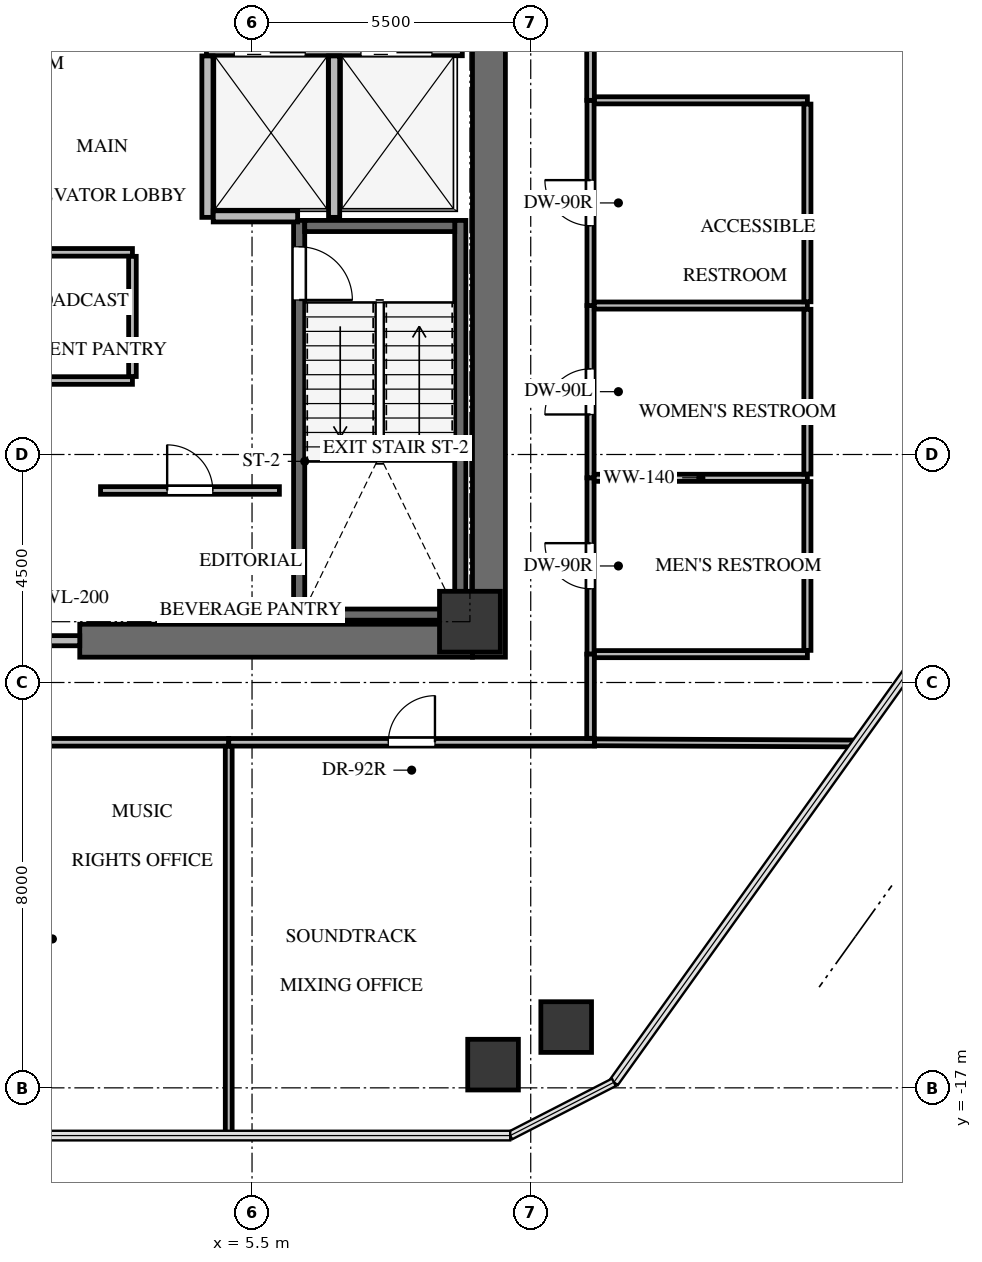
"""IFC4 building model, lengths in metres.
Left out: names, types, materials, properties, quantities, classifications, styles, units other than length and angle.
Written with IfcOpenShell. Run it as: python <this file> out.ifc"""

import sys

from ifc_helpers import new_model, si_unit, direction, frame, frame_2d, origin, origin_2d, place, context, subcontext, project, spatial, rectangle, extrude, source, transform, mapped, element, fill, save


model = new_model("IFC4")
c1 = context("Model", 3, precision=1e-05, world=origin(), true_north=direction((0.0, 1.0)))
c2 = subcontext(c1, "Body", "Model", "MODEL_VIEW")
j1 = project(units=[si_unit("LENGTHUNIT", "METRE"), si_unit("PLANEANGLEUNIT", "RADIAN")], contexts=[c1])
p1 = place(None, origin())
s1 = spatial("IfcSite", under=j1, at=p1, CompositionType="ELEMENT")
p2 = place(p1, origin())
s2 = spatial("IfcBuilding", under=s1, at=p2, CompositionType="ELEMENT")
p3 = place(p2, frame((0.0, 0.0, 209.2)))
s3 = spatial("IfcBuildingStorey", under=s2, at=p3, CompositionType="ELEMENT", Elevation=209.2)
p4 = place(p3, frame((10.175, -8.5, 0.0), z_axis=(0.0, 0.0, 1.0), x_axis=(0.0, 1.0, 0.0)))
e1 = element("IfcWall", 1, at=p4, inside=s3, PredefinedType="SHEAR", context=c2, shape_type="SweptSolid", body=[
    extrude(rectangle(XDim=17.0, YDim=0.65, at=frame_2d((8.5, 0.0))), origin(), (0.0, 0.0, 1.0), 4.2),
])
p5 = place(p3, frame((2.1, -8.175, 0.0), z_axis=(0.0, 0.0, 1.0), x_axis=(1.0, 0.0, 0.0)))
e2 = element("IfcWall", 2, at=p5, inside=s3, PredefinedType="SHEAR", context=c2, shape_type="SweptSolid", body=[
    extrude(rectangle(XDim=7.75, YDim=0.65, at=frame_2d((3.875, 0.0))), origin(), (0.0, 0.0, 1.0), 4.2),
])
p6 = place(p3, frame((9.61, -7.77, -0.24), z_axis=(0.0, 0.0, 1.0), x_axis=(0.0, 1.0, 0.0)))
e3 = element("IfcWall", 3, at=p6, inside=s3, PredefinedType="SHEAR", context=c2, shape_type="SweptSolid", body=[
    extrude(rectangle(XDim=7.89, YDim=0.22, at=frame_2d((3.945, 0.0))), origin(), (0.0, 0.0, 1.0), 4.14),
])
p7 = place(p3, frame((6.43, 0.12, -0.24), z_axis=(0.0, 0.0, 1.0), x_axis=(0.0, -1.0, 0.0)))
e4 = element("IfcWall", 4, at=p7, inside=s3, PredefinedType="SHEAR", context=c2, shape_type="SweptSolid", body=[
    extrude(rectangle(XDim=7.89, YDim=0.22, at=frame_2d((3.945, 0.0))), origin(), (0.0, 0.0, 1.0), 4.14),
])
p8 = place(p7, frame((0.52, 0.0, 0.0)))
e5 = element("IfcOpeningElement", 5, at=p8, cuts=e4, PredefinedType="OPENING", context=c2, shape_type="SweptSolid", body=[
    extrude(rectangle(XDim=1.05, YDim=2.15, at=frame_2d((0.525, 1.075))), frame((0.0, 0.12, 0.0), z_axis=(0.0, -1.0, 0.0), x_axis=(1.0, 0.0, 0.0)), (0.0, 0.0, 1.0), 0.24),
])
for number, where, z_axis, x_axis in (
    (6, (6.54, -7.66, -0.24), (0.0, 0.0, 1.0), (1.0, 0.0, 0.0)),
    (7, (9.5, 0.01, -0.24), (0.0, 0.0, 1.0), (-1.0, 0.0, 0.0)),
):
    element("IfcWall", number, at=place(p3, frame(where, z_axis=z_axis, x_axis=x_axis)), inside=s3, PredefinedType="SHEAR", context=c2, shape_type="SweptSolid", body=[
        extrude(rectangle(XDim=2.96, YDim=0.22, at=frame_2d((1.48, 0.0))), origin(), (0.0, 0.0, 1.0), 4.14),
    ])
m1 = source(origin(), c2, "Body", "SweptSolid", [
    extrude(rectangle(XDim=1.2, YDim=1.2, at=origin_2d()), origin(), (0.0, 0.0, 1.0), 4.14),
])
p9 = place(p3, frame((9.8, -7.8, -0.24), z_axis=(0.0, 0.0, 1.0), x_axis=(1.0, 0.0, 0.0)))
e8 = element("IfcColumn", 8, at=p9, inside=s3, PredefinedType="COLUMN", context=c2, shape_type="MappedRepresentation", body=[
    mapped(m1, transform((0.0, 0.0, 0.0), x_axis=(1.0, 0.0, 0.0), y_axis=(0.0, 1.0, 0.0), z_axis=(0.0, 0.0, 1.0), scale=1.0)),
])
m2 = source(origin(), c2, "Body", "SweptSolid", [
    extrude(rectangle(XDim=1.0, YDim=1.0, at=origin_2d()), origin(), (0.0, 0.0, 1.0), 4.14),
])
for number, where, z_axis, x_axis in (
    (9, (11.7, -15.8, -0.24), (0.0, 0.0, 1.0), (1.0, 0.0, 0.0)),
    (10, (10.257, -16.542, -0.24), (0.0, 0.0, 1.0), (1.0, 0.0, 0.0)),
):
    element("IfcColumn", number, at=place(p3, frame(where, z_axis=z_axis, x_axis=x_axis)), inside=s3, PredefinedType="COLUMN", context=c2, shape_type="MappedRepresentation", body=[
        mapped(m2, transform((0.0, 0.0, 0.0), x_axis=(1.0, 0.0, 0.0), y_axis=(0.0, 1.0, 0.0), z_axis=(0.0, 0.0, 1.0), scale=1.0)),
    ])
p10 = place(p3, frame((-2.1, -8.175, 0.0), z_axis=(0.0, 0.0, 1.0), x_axis=(1.0, 0.0, 0.0)))
e11 = element("IfcWall", 11, at=p10, inside=s3, PredefinedType="SOLIDWALL", context=c2, shape_type="SweptSolid", body=[
    extrude(rectangle(XDim=4.2, YDim=0.2, at=frame_2d((2.1, 0.0))), origin(), (0.0, 0.0, 1.0), 3.885),
])
p11 = place(p10, frame((1.2, 0.0, 0.0)))
e12 = element("IfcOpeningElement", 12, at=p11, cuts=e11, PredefinedType="OPENING", context=c2, shape_type="SweptSolid", body=[
    extrude(rectangle(XDim=1.8, YDim=2.15, at=frame_2d((0.9, 1.075))), frame((0.0, 0.11, 0.0), z_axis=(0.0, -1.0, 0.0), x_axis=(1.0, 0.0, 0.0)), (0.0, 0.0, 1.0), 0.22),
])
p12 = place(p3, frame((4.6, 3.48, 0.0), z_axis=(0.0, 0.0, 1.0), x_axis=(1.0, 0.0, 0.0)))
e13 = element("IfcWall", 13, at=p12, inside=s3, PredefinedType="SOLIDWALL", context=c2, shape_type="SweptSolid", body=[
    extrude(rectangle(XDim=5.05, YDim=0.22, at=frame_2d((2.525, 0.0))), origin(), (0.0, 0.0, 1.0), 3.885),
])
p13 = place(p12, frame((0.55, 0.0, 0.0)))
e14 = element("IfcOpeningElement", 14, at=p13, cuts=e13, PredefinedType="OPENING", context=c2, shape_type="SweptSolid", body=[
    extrude(rectangle(XDim=1.4, YDim=2.15, at=frame_2d((0.7, 1.075))), frame((0.0, 0.12, 0.0), z_axis=(0.0, -1.0, 0.0), x_axis=(1.0, 0.0, 0.0)), (0.0, 0.0, 1.0), 0.24),
])
p14 = place(p12, frame((3.05, 0.0, 0.0)))
e15 = element("IfcOpeningElement", 15, at=p14, cuts=e13, PredefinedType="OPENING", context=c2, shape_type="SweptSolid", body=[
    extrude(rectangle(XDim=1.4, YDim=2.15, at=frame_2d((0.7, 1.075))), frame((0.0, 0.12, 0.0), z_axis=(0.0, -1.0, 0.0), x_axis=(1.0, 0.0, 0.0)), (0.0, 0.0, 1.0), 0.24),
])
for number, where, z_axis, x_axis in (
    (16, (4.62, 0.18, 0.0), (0.0, 0.0, 1.0), (0.0, 1.0, 0.0)),
    (17, (7.12, 0.18, 0.0), (0.0, 0.0, 1.0), (0.0, 1.0, 0.0)),
):
    element("IfcWall", number, at=place(p3, frame(where, z_axis=z_axis, x_axis=x_axis)), inside=s3, PredefinedType="SOLIDWALL", context=c2, shape_type="SweptSolid", body=[
        extrude(rectangle(XDim=3.186, YDim=0.22, at=frame_2d((1.593, 0.0))), origin(), (0.0, 0.0, 1.0), 3.885),
    ])
p15 = place(p3, frame((4.734, 0.2, 0.0), z_axis=(0.0, 0.0, 1.0), x_axis=(1.0, 0.0, 0.0)))
e18 = element("IfcWall", 18, at=p15, inside=s3, PredefinedType="SOLIDWALL", context=c2, shape_type="SweptSolid", body=[
    extrude(rectangle(XDim=1.666, YDim=0.22, at=frame_2d((0.833, 0.0))), origin(), (0.0, 0.0, 1.0), 3.885),
])
p16 = place(p3, frame((2.51, -5.21, 0.0), z_axis=(0.0, 0.0, 1.0), x_axis=(1.0, 0.0, 0.0)))
e19 = element("IfcWall", 19, at=p16, inside=s3, PredefinedType="PARTITIONING", context=c2, shape_type="SweptSolid", body=[
    extrude(rectangle(XDim=3.53, YDim=0.15, at=frame_2d((1.765, 0.0))), origin(), (0.0, 0.0, 1.0), 3.885),
])
p17 = place(p16, frame((1.315, 0.0, 0.0)))
e20 = element("IfcOpeningElement", 20, at=p17, cuts=e19, PredefinedType="OPENING", context=c2, shape_type="SweptSolid", body=[
    extrude(rectangle(XDim=0.9, YDim=2.05, at=frame_2d((0.45, 1.025))), frame((0.0, 0.085, 0.0), z_axis=(0.0, -1.0, 0.0), x_axis=(1.0, 0.0, 0.0)), (0.0, 0.0, 1.0), 0.17),
])
p18 = place(p3, frame((3.14, -3.04, 0.0), z_axis=(0.0, 0.0, 1.0), x_axis=(-1.0, 0.0, 0.0)))
e21 = element("IfcWall", 21, at=p18, inside=s3, PredefinedType="PARTITIONING", context=c2, shape_type="SweptSolid", body=[
    extrude(rectangle(XDim=7.48, YDim=0.15, at=frame_2d((3.74, 0.0))), origin(), (0.0, 0.0, 1.0), 3.885),
])
p19 = place(p18, frame((3.29, 0.0, 0.0)))
e22 = element("IfcOpeningElement", 22, at=p19, cuts=e21, PredefinedType="OPENING", context=c2, shape_type="SweptSolid", body=[
    extrude(rectangle(XDim=0.9, YDim=2.05, at=frame_2d((0.45, 1.025))), frame((0.0, 0.085, 0.0), z_axis=(0.0, -1.0, 0.0), x_axis=(1.0, 0.0, 0.0)), (0.0, 0.0, 1.0), 0.17),
])
p20 = place(p3, frame((-4.34, -0.51, 0.0), z_axis=(0.0, 0.0, 1.0), x_axis=(1.0, 0.0, 0.0)))
e23 = element("IfcWall", 23, at=p20, inside=s3, PredefinedType="PARTITIONING", context=c2, shape_type="SweptSolid", body=[
    extrude(rectangle(XDim=7.48, YDim=0.15, at=frame_2d((3.74, 0.0))), origin(), (0.0, 0.0, 1.0), 3.885),
])
p21 = place(p3, frame((3.14, -0.589, 0.0), z_axis=(0.0, 0.0, 1.0), x_axis=(0.0, -1.0, 0.0)))
e24 = element("IfcWall", 24, at=p21, inside=s3, PredefinedType="PARTITIONING", context=c2, shape_type="SweptSolid", body=[
    extrude(rectangle(XDim=2.372, YDim=0.15, at=frame_2d((1.186, 0.0))), origin(), (0.0, 0.0, 1.0), 3.885),
])
p22 = place(p3, frame((12.18, -8.44, 0.0), z_axis=(0.0, 0.0, 1.0), x_axis=(0.0, 1.0, 0.0)))
e25 = element("IfcWall", 25, at=p22, inside=s3, PredefinedType="PARTITIONING", context=c2, shape_type="SweptSolid", body=[
    extrude(rectangle(XDim=3.48, YDim=0.14, at=frame_2d((1.74, 0.0))), origin(), (0.0, 0.0, 1.0), 3.885),
])
p23 = place(p22, frame((1.29, 0.0, 0.0)))
e26 = element("IfcOpeningElement", 26, at=p23, cuts=e25, PredefinedType="OPENING", context=c2, shape_type="SweptSolid", body=[
    extrude(rectangle(XDim=0.9, YDim=2.05, at=frame_2d((0.45, 1.025))), frame((0.0, 0.08, 0.0), z_axis=(0.0, -1.0, 0.0), x_axis=(1.0, 0.0, 0.0)), (0.0, 0.0, 1.0), 0.16),
])
p24 = place(p3, frame((12.18, -4.96, 0.0), z_axis=(0.0, 0.0, 1.0), x_axis=(0.0, 1.0, 0.0)))
e27 = element("IfcWall", 27, at=p24, inside=s3, PredefinedType="PARTITIONING", context=c2, shape_type="SweptSolid", body=[
    extrude(rectangle(XDim=3.4, YDim=0.14, at=frame_2d((1.7, 0.0))), origin(), (0.0, 0.0, 1.0), 3.885),
])
p25 = place(p24, frame((1.25, 0.0, 0.0)))
e28 = element("IfcOpeningElement", 28, at=p25, cuts=e27, PredefinedType="OPENING", context=c2, shape_type="SweptSolid", body=[
    extrude(rectangle(XDim=0.9, YDim=2.05, at=frame_2d((0.45, 1.025))), frame((0.0, 0.08, 0.0), z_axis=(0.0, -1.0, 0.0), x_axis=(1.0, 0.0, 0.0)), (0.0, 0.0, 1.0), 0.16),
])
p26 = place(p3, frame((12.18, -1.56, 0.0), z_axis=(0.0, 0.0, 1.0), x_axis=(0.0, 1.0, 0.0)))
e29 = element("IfcWall", 29, at=p26, inside=s3, PredefinedType="PARTITIONING", context=c2, shape_type="SweptSolid", body=[
    extrude(rectangle(XDim=4.05, YDim=0.14, at=frame_2d((2.025, 0.0))), origin(), (0.0, 0.0, 1.0), 2.47),
])
p27 = place(p26, frame((1.575, 0.0, 0.0)))
e30 = element("IfcOpeningElement", 30, at=p27, cuts=e29, PredefinedType="OPENING", context=c2, shape_type="SweptSolid", body=[
    extrude(rectangle(XDim=0.9, YDim=2.05, at=frame_2d((0.45, 1.025))), frame((0.0, 0.08, 0.0), z_axis=(0.0, -1.0, 0.0), x_axis=(1.0, 0.0, 0.0)), (0.0, 0.0, 1.0), 0.16),
])
p28 = place(p3, frame((1.089, -10.18, 0.0), z_axis=(0.0, 0.0, 1.0), x_axis=(1.0, 0.0, 0.0)))
e31 = element("IfcWall", 31, at=p28, inside=s3, PredefinedType="PARTITIONING", context=c2, shape_type="SweptSolid", body=[
    extrude(rectangle(XDim=3.951, YDim=0.15, at=frame_2d((1.976, 0.0))), origin(), (0.0, 0.0, 1.0), 2.47),
])
p29 = place(p3, frame((5.04, -10.18, 0.0), z_axis=(0.0, 0.0, 1.0), x_axis=(1.0, 0.0, 0.0)))
e32 = element("IfcWall", 32, at=p29, inside=s3, PredefinedType="PARTITIONING", context=c2, shape_type="SweptSolid", body=[
    extrude(rectangle(XDim=7.22, YDim=0.15, at=frame_2d((3.61, 0.0))), origin(), (0.0, 0.0, 1.0), 2.47),
])
p30 = place(p29, frame((3.15, 0.0, 0.0)))
e33 = element("IfcOpeningElement", 33, at=p30, cuts=e32, PredefinedType="OPENING", context=c2, shape_type="SweptSolid", body=[
    extrude(rectangle(XDim=0.92, YDim=2.1, at=frame_2d((0.46, 1.05))), frame((0.0, 0.085, 0.0), z_axis=(0.0, -1.0, 0.0), x_axis=(1.0, 0.0, 0.0)), (0.0, 0.0, 1.0), 0.17),
])
p31 = place(p3, frame((12.18, 2.49, 0.0), z_axis=(0.0, 0.0, 1.0), x_axis=(0.0, 1.0, 0.0)))
e34 = element("IfcWall", 34, at=p31, inside=s3, PredefinedType="PARTITIONING", context=c2, shape_type="SweptSolid", body=[
    extrude(rectangle(XDim=7.611, YDim=0.15, at=frame_2d((3.806, 0.0))), origin(), (0.0, 0.0, 1.0), 3.885),
])
p32 = place(p31, frame((3.331, 0.0, 0.0)))
e35 = element("IfcOpeningElement", 35, at=p32, cuts=e34, PredefinedType="OPENING", context=c2, shape_type="SweptSolid", body=[
    extrude(rectangle(XDim=0.95, YDim=2.1, at=frame_2d((0.475, 1.05))), frame((0.0, 0.085, 0.0), z_axis=(0.0, -1.0, 0.0), x_axis=(1.0, 0.0, 0.0)), (0.0, 0.0, 1.0), 0.17),
])
p33 = place(p3, frame((12.18, -10.101, 0.0), z_axis=(0.0, 0.0, 1.0), x_axis=(0.0, 1.0, 0.0)))
e36 = element("IfcWall", 36, at=p33, inside=s3, PredefinedType="PARTITIONING", context=c2, shape_type="SweptSolid", body=[
    extrude(rectangle(XDim=1.661, YDim=0.15, at=frame_2d((0.831, 0.0))), origin(), (0.0, 0.0, 1.0), 3.885),
])
p34 = place(p3, frame((12.254, -4.96, 0.0), z_axis=(0.0, 0.0, 1.0), x_axis=(1.0, 0.0, 0.0)))
e37 = element("IfcWall", 37, at=p34, inside=s3, PredefinedType="PARTITIONING", context=c2, shape_type="SweptSolid", body=[
    extrude(rectangle(XDim=4.206, YDim=0.14, at=frame_2d((2.103, 0.0))), origin(), (0.0, 0.0, 1.0), 3.885),
])
p35 = place(p3, frame((16.46, -8.44, 0.0), z_axis=(0.0, 0.0, 1.0), x_axis=(-1.0, 0.0, 0.0)))
e38 = element("IfcWall", 38, at=p35, inside=s3, PredefinedType="PARTITIONING", context=c2, shape_type="SweptSolid", body=[
    extrude(rectangle(XDim=4.201, YDim=0.14, at=frame_2d((2.101, 0.0))), origin(), (0.0, 0.0, 1.0), 2.47),
])
p36 = place(p3, frame((16.46, -5.034, 0.0), z_axis=(0.0, 0.0, 1.0), x_axis=(0.0, -1.0, 0.0)))
e39 = element("IfcWall", 39, at=p36, inside=s3, PredefinedType="PARTITIONING", context=c2, shape_type="SweptSolid", body=[
    extrude(rectangle(XDim=3.332, YDim=0.14, at=frame_2d((1.666, 0.0))), origin(), (0.0, 0.0, 1.0), 2.47),
])
p37 = place(p3, frame((12.254, -1.56, 0.0), z_axis=(0.0, 0.0, 1.0), x_axis=(1.0, 0.0, 0.0)))
e40 = element("IfcWall", 40, at=p37, inside=s3, PredefinedType="PARTITIONING", context=c2, shape_type="SweptSolid", body=[
    extrude(rectangle(XDim=4.206, YDim=0.14, at=frame_2d((2.103, 0.0))), origin(), (0.0, 0.0, 1.0), 2.47),
])
p38 = place(p3, frame((16.46, -1.634, 0.0), z_axis=(0.0, 0.0, 1.0), x_axis=(0.0, -1.0, 0.0)))
e41 = element("IfcWall", 41, at=p38, inside=s3, PredefinedType="PARTITIONING", context=c2, shape_type="SweptSolid", body=[
    extrude(rectangle(XDim=3.252, YDim=0.14, at=frame_2d((1.626, 0.0))), origin(), (0.0, 0.0, 1.0), 2.47),
])
p39 = place(p3, frame((12.259, 2.49, 0.0), z_axis=(0.0, 0.0, 1.0), x_axis=(1.0, 0.0, 0.0)))
e42 = element("IfcWall", 42, at=p39, inside=s3, PredefinedType="PARTITIONING", context=c2, shape_type="SweptSolid", body=[
    extrude(rectangle(XDim=4.201, YDim=0.14, at=frame_2d((2.101, 0.0))), origin(), (0.0, 0.0, 1.0), 3.885),
])
p40 = place(p3, frame((16.46, 2.416, 0.0), z_axis=(0.0, 0.0, 1.0), x_axis=(0.0, -1.0, 0.0)))
e43 = element("IfcWall", 43, at=p40, inside=s3, PredefinedType="PARTITIONING", context=c2, shape_type="SweptSolid", body=[
    extrude(rectangle(XDim=3.902, YDim=0.14, at=frame_2d((1.951, 0.0))), origin(), (0.0, 0.0, 1.0), 2.47),
])
p41 = place(p3, frame((5.04, -10.259, 0.0), z_axis=(0.0, 0.0, 1.0), x_axis=(0.0, -1.0, 0.0)))
e44 = element("IfcWall", 44, at=p41, inside=s3, PredefinedType="PARTITIONING", context=c2, shape_type="SweptSolid", body=[
    extrude(rectangle(XDim=7.683, YDim=0.135, at=frame_2d((3.841, 0.0))), origin(), (0.0, 0.0, 1.0), 2.47),
])
p42 = place(p3, frame((12.26, -10.18, 0.0), z_axis=(0.0, 0.0, 1.0), x_axis=(0.999990144117, -0.004439782427, 0.0)))
e45 = element("IfcWall", 45, at=p42, inside=s3, PredefinedType="PARTITIONING", context=c2, shape_type="SweptSolid", body=[
    extrude(rectangle(XDim=5.169, YDim=0.135, at=frame_2d((2.584, 0.0))), origin(), (0.0, 0.0, 1.0), 2.47),
])
m3 = source(origin(), c2, "Body", "SweptSolid", [
    extrude(rectangle(XDim=1.05, YDim=2.15, at=frame_2d((0.525, 1.075))), frame((0.0, 0.025, 0.0), z_axis=(0.0, -1.0, 0.0), x_axis=(1.0, 0.0, 0.0)), (0.0, 0.0, 1.0), 0.05),
])
p43 = place(p8, origin())
e46 = element("IfcDoor", 46, at=p43, inside=s3, OperationType="SINGLE_SWING_RIGHT", PredefinedType="DOOR", context=c2, shape_type="MappedRepresentation", body=[
    mapped(m3, transform((0.0, 0.0, 0.0), x_axis=(1.0, 0.0, 0.0), y_axis=(0.0, 1.0, 0.0), z_axis=(0.0, 0.0, 1.0), scale=1.0)),
])
fill(e5, e46)
m4 = source(origin(), c2, "Body", "SweptSolid", [
    extrude(rectangle(XDim=0.9, YDim=2.05, at=frame_2d((0.45, 1.025))), frame((0.0, 0.025, 0.0), z_axis=(0.0, -1.0, 0.0), x_axis=(1.0, 0.0, 0.0)), (0.0, 0.0, 1.0), 0.05),
])
p44 = place(p17, origin())
e47 = element("IfcDoor", 47, at=p44, inside=s3, OperationType="SINGLE_SWING_LEFT", PredefinedType="DOOR", context=c2, shape_type="MappedRepresentation", body=[
    mapped(m4, transform((0.0, 0.0, 0.0), x_axis=(1.0, 0.0, 0.0), y_axis=(0.0, 1.0, 0.0), z_axis=(0.0, 0.0, 1.0), scale=1.0)),
])
fill(e20, e47)
m5 = source(origin(), c2, "Body", "SweptSolid", [
    extrude(rectangle(XDim=0.9, YDim=2.05, at=frame_2d((0.45, 1.025))), frame((0.0, 0.025, 0.0), z_axis=(0.0, -1.0, 0.0), x_axis=(1.0, 0.0, 0.0)), (0.0, 0.0, 1.0), 0.05),
])
p45 = place(p23, origin())
e48 = element("IfcDoor", 48, at=p45, inside=s3, OperationType="SINGLE_SWING_RIGHT", PredefinedType="DOOR", context=c2, shape_type="MappedRepresentation", body=[
    mapped(m5, transform((0.0, 0.0, 0.0), x_axis=(1.0, 0.0, 0.0), y_axis=(0.0, 1.0, 0.0), z_axis=(0.0, 0.0, 1.0), scale=1.0)),
])
fill(e26, e48)
m6 = source(origin(), c2, "Body", "SweptSolid", [
    extrude(rectangle(XDim=0.9, YDim=2.05, at=frame_2d((0.45, 1.025))), frame((0.0, 0.025, 0.0), z_axis=(0.0, -1.0, 0.0), x_axis=(1.0, 0.0, 0.0)), (0.0, 0.0, 1.0), 0.05),
])
p46 = place(p25, origin())
e49 = element("IfcDoor", 49, at=p46, inside=s3, OperationType="SINGLE_SWING_LEFT", PredefinedType="DOOR", context=c2, shape_type="MappedRepresentation", body=[
    mapped(m6, transform((0.0, 0.0, 0.0), x_axis=(1.0, 0.0, 0.0), y_axis=(0.0, 1.0, 0.0), z_axis=(0.0, 0.0, 1.0), scale=1.0)),
])
fill(e28, e49)
p47 = place(p27, origin())
e50 = element("IfcDoor", 50, at=p47, inside=s3, OperationType="SINGLE_SWING_RIGHT", PredefinedType="DOOR", context=c2, shape_type="MappedRepresentation", body=[
    mapped(m5, transform((0.0, 0.0, 0.0), x_axis=(1.0, 0.0, 0.0), y_axis=(0.0, 1.0, 0.0), z_axis=(0.0, 0.0, 1.0), scale=1.0)),
])
fill(e30, e50)
m7 = source(origin(), c2, "Body", "SweptSolid", [
    extrude(rectangle(XDim=0.92, YDim=2.1, at=frame_2d((0.46, 1.05))), frame((0.0, 0.025, 0.0), z_axis=(0.0, -1.0, 0.0), x_axis=(1.0, 0.0, 0.0)), (0.0, 0.0, 1.0), 0.05),
])
p48 = place(p30, origin())
e51 = element("IfcDoor", 51, at=p48, inside=s3, OperationType="SINGLE_SWING_RIGHT", PredefinedType="DOOR", context=c2, shape_type="MappedRepresentation", body=[
    mapped(m7, transform((0.0, 0.0, 0.0), x_axis=(1.0, 0.0, 0.0), y_axis=(0.0, 1.0, 0.0), z_axis=(0.0, 0.0, 1.0), scale=1.0)),
])
fill(e33, e51)
save(model, sys.argv[1])
